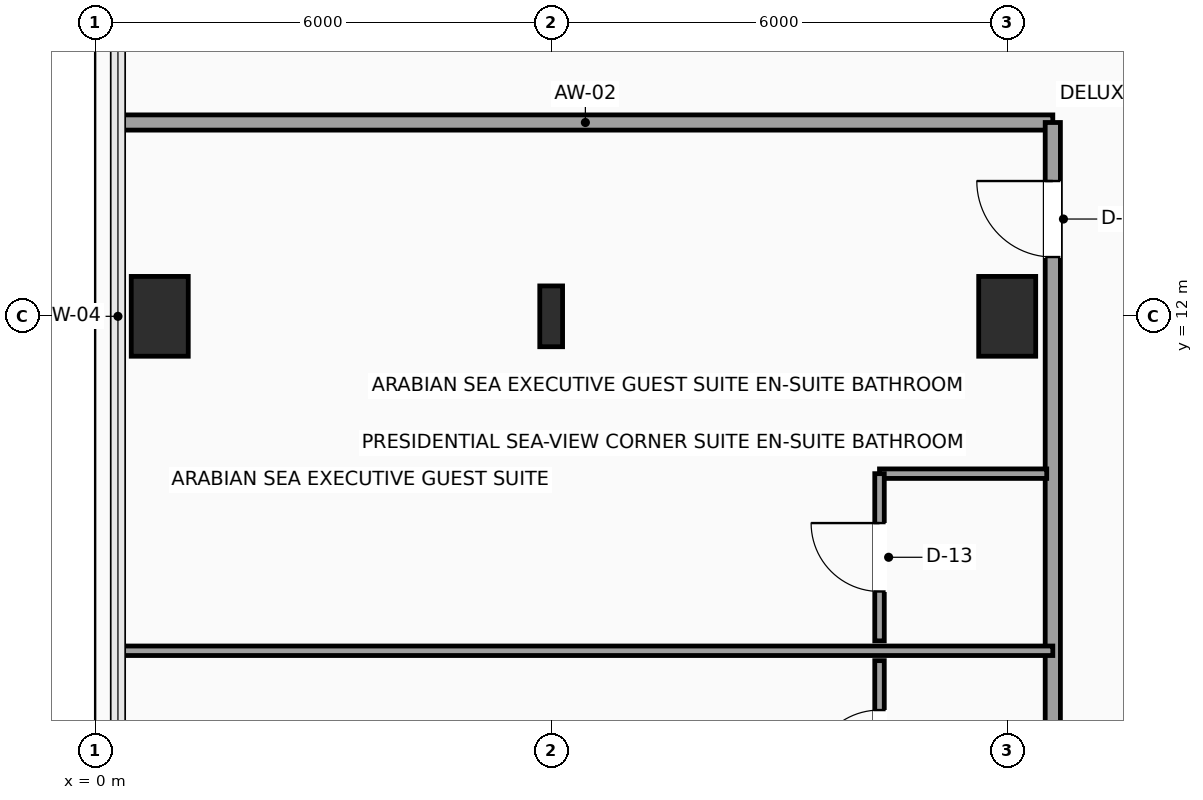
"""IFC4 building model, lengths in metres.
Left out: names, types, materials, properties, quantities, classifications, styles, units other than length and angle.
Written with IfcOpenShell. Run it as: python <this file> out.ifc"""

import sys

from ifc_helpers import new_model, si_unit, direction, frame, frame_2d, origin, origin_2d, place, context, subcontext, project, spatial, rectangle, i_section, extrude, element, fill, save


model = new_model("IFC4")
c1 = context("Model", 3, precision=1e-05, world=origin(), true_north=direction((0.0, 1.0)))
c2 = subcontext(c1, "Body", "Model", "MODEL_VIEW")
j1 = project(units=[si_unit("LENGTHUNIT", "METRE"), si_unit("PLANEANGLEUNIT", "RADIAN")], contexts=[c1])
p1 = place(None, origin())
s1 = spatial("IfcSite", under=j1, at=p1, CompositionType="ELEMENT")
p2 = place(p1, origin())
s2 = spatial("IfcBuilding", under=s1, at=p2, CompositionType="ELEMENT")
p3 = place(p2, frame((0.0, 0.0, 212.4)))
s3 = spatial("IfcBuildingStorey", under=s2, at=p3, CompositionType="ELEMENT", Elevation=212.4)
p4 = place(p3, frame((0.85, 12.0, 0.0), z_axis=(0.0, 0.0, 1.0), x_axis=(1.0, 0.0, 0.0)))
e1 = element("IfcColumn", 1, at=p4, inside=s3, PredefinedType="COLUMN", context=c2, shape_type="SweptSolid", body=[
    extrude(rectangle(XDim=0.75, YDim=1.05, at=origin_2d()), origin(), (0.0, 0.0, 1.0), 3.75),
])
p5 = place(p3, frame((6.0, 12.0, 0.0), z_axis=(0.0, 0.0, 1.0), x_axis=(1.0, 0.0, 0.0)))
e2 = element("IfcColumn", 2, at=p5, inside=s3, PredefinedType="COLUMN", context=c2, shape_type="SweptSolid", body=[
    extrude(i_section(OverallWidth=0.3, OverallDepth=0.8, WebThickness=0.018, FlangeThickness=0.033, FilletRadius=0.03, at=origin_2d()), origin(), (0.0, 0.0, 1.0), 3.75),
])
p6 = place(p3, frame((12.0, 12.0, 0.0), z_axis=(0.0, 0.0, 1.0), x_axis=(1.0, 0.0, 0.0)))
e3 = element("IfcColumn", 3, at=p6, inside=s3, PredefinedType="COLUMN", context=c2, shape_type="SweptSolid", body=[
    extrude(rectangle(XDim=0.75, YDim=1.05, at=origin_2d()), origin(), (0.0, 0.0, 1.0), 3.75),
])
p7 = place(p3, frame((12.6, 14.55, 0.0), z_axis=(0.0, 0.0, 1.0), x_axis=(-1.0, 0.0, 0.0)))
e4 = element("IfcWall", 4, at=p7, inside=s3, PredefinedType="PARTITIONING", context=c2, shape_type="SweptSolid", body=[
    extrude(rectangle(XDim=12.3, YDim=0.2, at=frame_2d((6.15, 0.0))), origin(), (0.0, 0.0, 1.0), 3.54),
])
p8 = place(p3, frame((12.6, 1.8, 0.0), z_axis=(0.0, 0.0, 1.0), x_axis=(0.0, 1.0, 0.0)))
e5 = element("IfcWall", 5, at=p8, inside=s3, PredefinedType="PARTITIONING", context=c2, shape_type="SweptSolid", body=[
    extrude(rectangle(XDim=12.75, YDim=0.2, at=frame_2d((6.375, 0.0))), origin(), (0.0, 0.0, 1.0), 3.54),
])
p9 = place(p8, frame((1.825, 0.0, 0.0)))
e6 = element("IfcOpeningElement", 6, at=p9, cuts=e5, PredefinedType="OPENING", context=c2, shape_type="SweptSolid", body=[
    extrude(rectangle(XDim=1.0, YDim=2.2, at=frame_2d((0.5, 1.1))), frame((0.0, 0.11, 0.0), z_axis=(0.0, -1.0, 0.0), x_axis=(1.0, 0.0, 0.0)), (0.0, 0.0, 1.0), 0.22),
])
p10 = place(p8, frame((10.98, 0.0, 0.0)))
e7 = element("IfcOpeningElement", 7, at=p10, cuts=e5, PredefinedType="OPENING", context=c2, shape_type="SweptSolid", body=[
    extrude(rectangle(XDim=1.0, YDim=2.2, at=frame_2d((0.5, 1.1))), frame((0.0, 0.11, 0.0), z_axis=(0.0, -1.0, 0.0), x_axis=(1.0, 0.0, 0.0)), (0.0, 0.0, 1.0), 0.22),
])
p11 = place(p3, frame((0.3, 7.6, 0.0), z_axis=(0.0, 0.0, 1.0), x_axis=(1.0, 0.0, 0.0)))
e8 = element("IfcWall", 8, at=p11, inside=s3, PredefinedType="PARTITIONING", context=c2, shape_type="SweptSolid", body=[
    extrude(rectangle(XDim=12.3, YDim=0.125, at=frame_2d((6.15, 0.0))), origin(), (0.0, 0.0, 1.0), 3.54),
])
p12 = place(p3, frame((0.35, 0.35, 0.0), z_axis=(0.0, 0.0, 1.0), x_axis=(-0.006903122154, 0.999976173168, 0.0)))
e9 = element("IfcWall", 9, at=p12, inside=s3, PredefinedType="PARTITIONING", context=c2, shape_type="SweptSolid", body=[
    extrude(rectangle(XDim=7.25, YDim=0.125, at=frame_2d((3.625, 0.0))), origin(), (0.0, 0.0, 1.0), 3.54),
])
p13 = place(p3, frame((10.32, 5.27, 0.0), z_axis=(0.0, 0.0, 1.0), x_axis=(0.0, 1.0, 0.0)))
e10 = element("IfcWall", 10, at=p13, inside=s3, PredefinedType="PARTITIONING", context=c2, shape_type="SweptSolid", body=[
    extrude(rectangle(XDim=2.2, YDim=0.125, at=frame_2d((1.1, 0.0))), origin(), (0.0, 0.0, 1.0), 3.54),
])
p14 = place(p13, frame((0.65, 0.0, 0.0)))
e11 = element("IfcOpeningElement", 11, at=p14, cuts=e10, PredefinedType="OPENING", context=c2, shape_type="SweptSolid", body=[
    extrude(rectangle(XDim=0.9, YDim=2.1, at=frame_2d((0.45, 1.05))), frame((0.0, 0.073, 0.0), z_axis=(0.0, -1.0, 0.0), x_axis=(1.0, 0.0, 0.0)), (0.0, 0.0, 1.0), 0.145),
])
p15 = place(p3, frame((10.32, 9.93, 0.0), z_axis=(0.0, 0.0, 1.0), x_axis=(1.0, 0.0, 0.0)))
e12 = element("IfcWall", 12, at=p15, inside=s3, PredefinedType="PARTITIONING", context=c2, shape_type="SweptSolid", body=[
    extrude(rectangle(XDim=2.2, YDim=0.125, at=frame_2d((1.1, 0.0))), origin(), (0.0, 0.0, 1.0), 3.54),
])
p16 = place(p3, frame((10.32, 7.73, 0.0), z_axis=(0.0, 0.0, 1.0), x_axis=(0.0, 1.0, 0.0)))
e13 = element("IfcWall", 13, at=p16, inside=s3, PredefinedType="PARTITIONING", context=c2, shape_type="SweptSolid", body=[
    extrude(rectangle(XDim=2.2, YDim=0.125, at=frame_2d((1.1, 0.0))), origin(), (0.0, 0.0, 1.0), 3.54),
])
p17 = place(p16, frame((0.65, 0.0, 0.0)))
e14 = element("IfcOpeningElement", 14, at=p17, cuts=e13, PredefinedType="OPENING", context=c2, shape_type="SweptSolid", body=[
    extrude(rectangle(XDim=0.9, YDim=2.1, at=frame_2d((0.45, 1.05))), frame((0.0, 0.073, 0.0), z_axis=(0.0, -1.0, 0.0), x_axis=(1.0, 0.0, 0.0)), (0.0, 0.0, 1.0), 0.145),
])
p18 = place(p10, origin())
e15 = element("IfcDoor", 15, at=p18, inside=s3, OperationType="SINGLE_SWING_RIGHT", PredefinedType="DOOR", context=c2, shape_type="SweptSolid", body=[
    extrude(rectangle(XDim=1.0, YDim=2.2, at=frame_2d((0.5, 1.1))), frame((0.0, 0.025, 0.0), z_axis=(0.0, -1.0, 0.0), x_axis=(1.0, 0.0, 0.0)), (0.0, 0.0, 1.0), 0.05),
])
fill(e7, e15)
p19 = place(p14, origin())
e16 = element("IfcDoor", 16, at=p19, inside=s3, OperationType="SINGLE_SWING_LEFT", PredefinedType="DOOR", context=c2, shape_type="SweptSolid", body=[
    extrude(rectangle(XDim=0.9, YDim=2.1, at=frame_2d((0.45, 1.05))), frame((0.0, 0.025, 0.0), z_axis=(0.0, -1.0, 0.0), x_axis=(1.0, 0.0, 0.0)), (0.0, 0.0, 1.0), 0.05),
])
fill(e11, e16)
p20 = place(p17, origin())
e17 = element("IfcDoor", 17, at=p20, inside=s3, OperationType="SINGLE_SWING_RIGHT", PredefinedType="DOOR", context=c2, shape_type="SweptSolid", body=[
    extrude(rectangle(XDim=0.9, YDim=2.1, at=frame_2d((0.45, 1.05))), frame((0.0, 0.025, 0.0), z_axis=(0.0, -1.0, 0.0), x_axis=(1.0, 0.0, 0.0)), (0.0, 0.0, 1.0), 0.05),
])
fill(e14, e17)
save(model, sys.argv[1])
